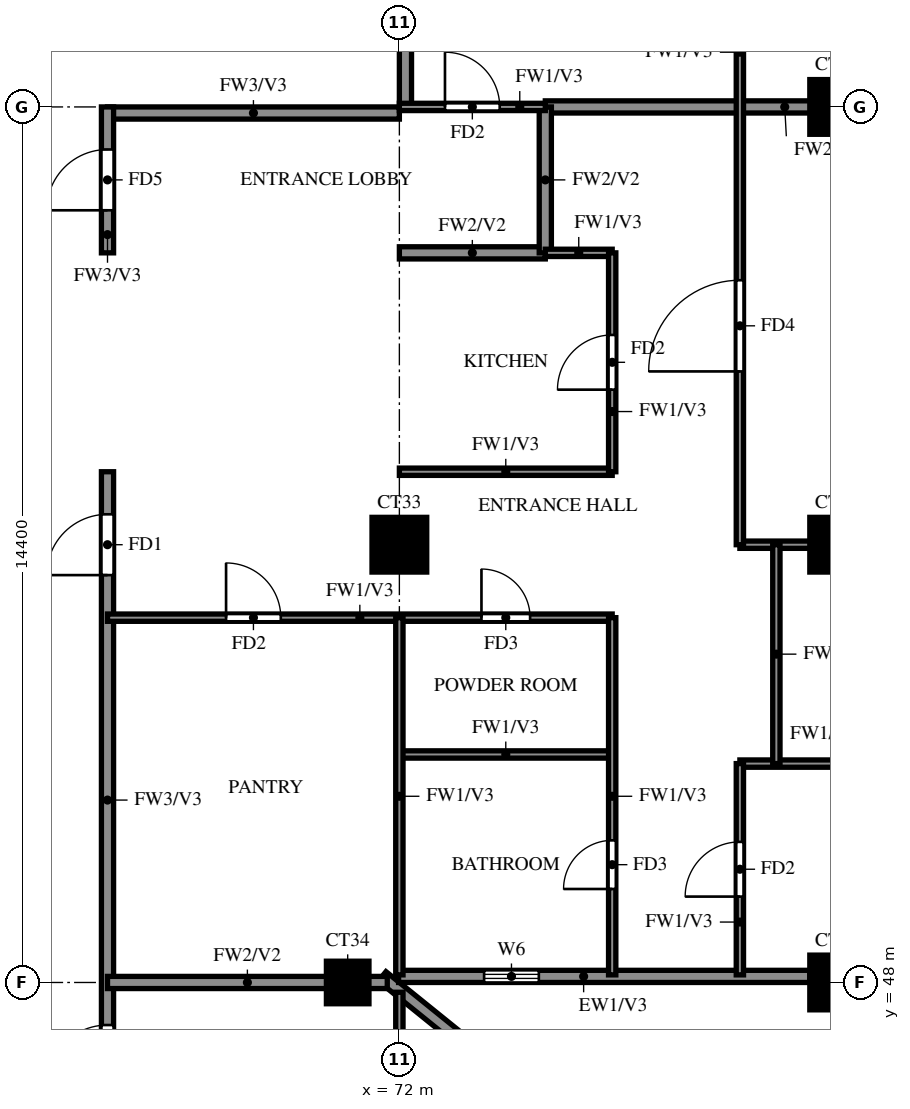
"""IFC4 building model, lengths in metres.
Left out: names, types, materials, properties, quantities, classifications, styles, units other than length and angle.
Written with IfcOpenShell. Run it as: python <this file> out.ifc"""

import sys

from ifc_helpers import new_model, si_unit, direction, frame, frame_2d, origin, origin_2d, place, context, subcontext, project, spatial, rectangle, extrude, source, transform, mapped, element, fill, save


model = new_model("IFC4")
c1 = context("Model", 3, precision=1e-05, world=origin(), true_north=direction((0.0, 1.0)))
c2 = subcontext(c1, "Body", "Model", "MODEL_VIEW")
j1 = project(units=[si_unit("LENGTHUNIT", "METRE"), si_unit("PLANEANGLEUNIT", "RADIAN")], contexts=[c1])
p1 = place(None, origin())
s1 = spatial("IfcSite", under=j1, at=p1, CompositionType="ELEMENT")
p2 = place(p1, origin())
s2 = spatial("IfcBuilding", under=s1, at=p2, CompositionType="ELEMENT")
p3 = place(p2, frame((0.0, 0.0, 225.5)))
s3 = spatial("IfcBuildingStorey", under=s2, at=p3, CompositionType="ELEMENT", Elevation=225.5)
m1 = source(origin(), c2, "Body", "SweptSolid", [
    extrude(rectangle(XDim=0.7, YDim=0.7, at=origin_2d()), origin(), (0.0, 0.0, 1.0), 3.22),
])
p4 = place(p3, frame((71.15, 48.0, 0.0), z_axis=(0.0, 0.0, 1.0), x_axis=(1.0, 0.0, 0.0)))
e1 = element("IfcColumn", 1, at=p4, inside=s3, PredefinedType="COLUMN", context=c2, shape_type="MappedRepresentation", body=[
    mapped(m1, transform((0.0, 0.0, 0.0))),
])
m2 = source(origin(), c2, "Body", "SweptSolid", [
    extrude(rectangle(XDim=0.9, YDim=0.9, at=origin_2d()), origin(), (0.0, 0.0, 1.0), 3.22),
])
for number, where, z_axis, x_axis in (
    (2, (79.2, 48.0, 0.0), (0.0, 0.0, 1.0), (1.0, 0.0, 0.0)),
    (3, (72.0, 55.2, 0.0), (0.0, 0.0, 1.0), (1.0, 0.0, 0.0)),
    (4, (79.2, 55.2, 0.0), (0.0, 0.0, 1.0), (1.0, 0.0, 0.0)),
    (5, (79.2, 62.4, 0.0), (0.0, 0.0, 1.0), (1.0, 0.0, 0.0)),
):
    element("IfcColumn", number, at=place(p3, frame(where, z_axis=z_axis, x_axis=x_axis)), inside=s3, PredefinedType="COLUMN", context=c2, shape_type="MappedRepresentation", body=[
        mapped(m2, transform((0.0, 0.0, 0.0))),
    ])
p5 = place(p3, frame((81.907, 39.87, 0.0), z_axis=(0.0, 0.0, 1.0), x_axis=(-0.777936274417, 0.62834318087, 0.0)))
e6 = element("IfcWall", 6, at=p5, inside=s3, PredefinedType="SOLIDWALL", context=c2, shape_type="SweptSolid", body=[
    extrude(rectangle(XDim=13.099, YDim=0.2, at=frame_2d((6.549, 0.0))), origin(), (0.0, 0.0, 1.0), 3.22),
])
p6 = place(p5, frame((9.938, 0.0, 1.5)))
e7 = element("IfcOpeningElement", 7, at=p6, cuts=e6, PredefinedType="OPENING", context=c2, shape_type="SweptSolid", body=[
    extrude(rectangle(XDim=0.9, YDim=0.9, at=frame_2d((0.45, 0.45))), frame((0.0, 0.11, 0.0), z_axis=(0.0, -1.0, 0.0), x_axis=(1.0, 0.0, 0.0)), (0.0, 0.0, 1.0), 0.22),
])
p7 = place(p3, frame((71.987, 48.1, 0.0), z_axis=(0.0, 0.0, 1.0), x_axis=(1.0, 0.0, 0.0)))
e8 = element("IfcWall", 8, at=p7, inside=s3, PredefinedType="SOLIDWALL", context=c2, shape_type="SweptSolid", body=[
    extrude(rectangle(XDim=6.763, YDim=0.2, at=frame_2d((3.381, 0.0))), origin(), (0.0, 0.0, 1.0), 3.22),
])
p8 = place(p7, frame((1.406, 0.0, 1.5)))
e9 = element("IfcOpeningElement", 9, at=p8, cuts=e8, PredefinedType="OPENING", context=c2, shape_type="SweptSolid", body=[
    extrude(rectangle(XDim=0.9, YDim=0.9, at=frame_2d((0.45, 0.45))), frame((0.0, 0.11, 0.0), z_axis=(0.0, -1.0, 0.0), x_axis=(1.0, 0.0, 0.0)), (0.0, 0.0, 1.0), 0.22),
])
p9 = place(p3, frame((67.2, 62.3, 0.0), z_axis=(0.0, 0.0, 1.0), x_axis=(1.0, 0.0, 0.0)))
e10 = element("IfcWall", 10, at=p9, inside=s3, PredefinedType="SOLIDWALL", context=c2, shape_type="SweptSolid", body=[
    extrude(rectangle(XDim=4.8, YDim=0.2, at=frame_2d((2.4, 0.0))), origin(), (0.0, 0.0, 1.0), 3.22),
])
p10 = place(p3, frame((67.2, 45.6, 0.0), z_axis=(0.0, 0.0, 1.0), x_axis=(0.0, 1.0, 0.0)))
e11 = element("IfcWall", 11, at=p10, inside=s3, PredefinedType="SOLIDWALL", context=c2, shape_type="SweptSolid", body=[
    extrude(rectangle(XDim=10.8, YDim=0.2, at=frame_2d((5.4, 0.0))), origin(), (0.0, 0.0, 1.0), 3.22),
])
p11 = place(p10, frame((9.1, 0.0, 0.0)))
e12 = element("IfcOpeningElement", 12, at=p11, cuts=e11, PredefinedType="OPENING", context=c2, shape_type="SweptSolid", body=[
    extrude(rectangle(XDim=1.0, YDim=2.1, at=frame_2d((0.5, 1.05))), frame((0.0, 0.11, 0.0), z_axis=(0.0, -1.0, 0.0), x_axis=(1.0, 0.0, 0.0)), (0.0, 0.0, 1.0), 0.22),
])
p12 = place(p10, frame((0.7, 0.0, 0.0)))
e13 = element("IfcOpeningElement", 13, at=p12, cuts=e11, PredefinedType="OPENING", context=c2, shape_type="SweptSolid", body=[
    extrude(rectangle(XDim=1.0, YDim=2.1, at=frame_2d((0.5, 1.05))), frame((0.0, 0.11, 0.0), z_axis=(0.0, -1.0, 0.0), x_axis=(1.0, 0.0, 0.0)), (0.0, 0.0, 1.0), 0.22),
])
p13 = place(p3, frame((67.2, 60.0, 0.0), z_axis=(0.0, 0.0, 1.0), x_axis=(0.0, 1.0, 0.0)))
e14 = element("IfcWall", 14, at=p13, inside=s3, PredefinedType="SOLIDWALL", context=c2, shape_type="SweptSolid", body=[
    extrude(rectangle(XDim=2.4, YDim=0.2, at=frame_2d((1.2, 0.0))), origin(), (0.0, 0.0, 1.0), 3.22),
])
p14 = place(p13, frame((0.7, 0.0, 0.0)))
e15 = element("IfcOpeningElement", 15, at=p14, cuts=e14, PredefinedType="OPENING", context=c2, shape_type="SweptSolid", body=[
    extrude(rectangle(XDim=1.0, YDim=2.1, at=frame_2d((0.5, 1.05))), frame((0.0, 0.11, 0.0), z_axis=(0.0, -1.0, 0.0), x_axis=(1.0, 0.0, 0.0)), (0.0, 0.0, 1.0), 0.22),
])
p15 = place(p3, frame((72.1, 62.4, 0.0), z_axis=(0.0, 0.0, 1.0), x_axis=(0.0, 1.0, 0.0)))
e16 = element("IfcWall", 16, at=p15, inside=s3, PredefinedType="SOLIDWALL", context=c2, shape_type="SweptSolid", body=[
    extrude(rectangle(XDim=15.6, YDim=0.2, at=frame_2d((7.8, 0.0))), origin(), (0.0, 0.0, 1.0), 3.22),
])
p16 = place(p3, frame((67.2, 48.0, 0.0), z_axis=(0.0, 0.0, 1.0), x_axis=(1.0, 0.0, 0.0)))
e17 = element("IfcWall", 17, at=p16, inside=s3, PredefinedType="SOLIDWALL", context=c2, shape_type="SweptSolid", body=[
    extrude(rectangle(XDim=4.601, YDim=0.2, at=frame_2d((2.301, 0.0))), origin(), (0.0, 0.0, 1.0), 3.22),
])
p17 = place(p3, frame((72.0, 60.0, 0.0), z_axis=(0.0, 0.0, 1.0), x_axis=(1.0, 0.0, 0.0)))
e18 = element("IfcWall", 18, at=p17, inside=s3, PredefinedType="SOLIDWALL", context=c2, shape_type="SweptSolid", body=[
    extrude(rectangle(XDim=2.4, YDim=0.2, at=frame_2d((1.2, 0.0))), origin(), (0.0, 0.0, 1.0), 3.22),
])
p18 = place(p3, frame((74.4, 62.4, 0.0), z_axis=(0.0, 0.0, 1.0), x_axis=(1.0, 0.0, 0.0)))
e19 = element("IfcWall", 19, at=p18, inside=s3, PredefinedType="SOLIDWALL", context=c2, shape_type="SweptSolid", body=[
    extrude(rectangle(XDim=7.875, YDim=0.2, at=frame_2d((3.938, 0.0))), origin(), (0.0, 0.0, 1.0), 3.22),
])
p19 = place(p3, frame((74.4, 60.0, 0.0), z_axis=(0.0, 0.0, 1.0), x_axis=(0.0, 1.0, 0.0)))
e20 = element("IfcWall", 20, at=p19, inside=s3, PredefinedType="SOLIDWALL", context=c2, shape_type="SweptSolid", body=[
    extrude(rectangle(XDim=2.4, YDim=0.2, at=frame_2d((1.2, 0.0))), origin(), (0.0, 0.0, 1.0), 3.22),
])
p20 = place(p3, frame((77.6, 51.6, 0.0), z_axis=(0.0, 0.0, 1.0), x_axis=(1.0, 0.0, 0.0)))
e21 = element("IfcWall", 21, at=p20, inside=s3, PredefinedType="PARTITIONING", context=c2, shape_type="SweptSolid", body=[
    extrude(rectangle(XDim=4.675, YDim=0.12, at=frame_2d((2.337, 0.0))), origin(), (0.0, 0.0, 1.0), 2.32),
])
p21 = place(p20, frame((2.238, 0.0, 0.0)))
e22 = element("IfcOpeningElement", 22, at=p21, cuts=e21, PredefinedType="OPENING", context=c2, shape_type="SweptSolid", body=[
    extrude(rectangle(XDim=0.8, YDim=2.1, at=frame_2d((0.4, 1.05))), frame((0.0, 0.07, 0.0), z_axis=(0.0, -1.0, 0.0), x_axis=(1.0, 0.0, 0.0)), (0.0, 0.0, 1.0), 0.14),
])
p22 = place(p3, frame((72.0, 51.75, 0.0), z_axis=(0.0, 0.0, 1.0), x_axis=(1.0, 0.0, 0.0)))
e23 = element("IfcWall", 23, at=p22, inside=s3, PredefinedType="PARTITIONING", context=c2, shape_type="SweptSolid", body=[
    extrude(rectangle(XDim=3.5, YDim=0.12, at=frame_2d((1.75, 0.0))), origin(), (0.0, 0.0, 1.0), 3.22),
])
p23 = place(p3, frame((67.2, 54.0, 0.0), z_axis=(0.0, 0.0, 1.0), x_axis=(1.0, 0.0, 0.0)))
e24 = element("IfcWall", 24, at=p23, inside=s3, PredefinedType="PARTITIONING", context=c2, shape_type="SweptSolid", body=[
    extrude(rectangle(XDim=8.3, YDim=0.12, at=frame_2d((4.15, 0.0))), origin(), (0.0, 0.0, 1.0), 3.22),
])
p24 = place(p23, frame((6.15, 0.0, 0.0)))
e25 = element("IfcOpeningElement", 25, at=p24, cuts=e24, PredefinedType="OPENING", context=c2, shape_type="SweptSolid", body=[
    extrude(rectangle(XDim=0.8, YDim=2.1, at=frame_2d((0.4, 1.05))), frame((0.0, 0.07, 0.0), z_axis=(0.0, -1.0, 0.0), x_axis=(1.0, 0.0, 0.0)), (0.0, 0.0, 1.0), 0.14),
])
p25 = place(p23, frame((1.95, 0.0, 0.0)))
e26 = element("IfcOpeningElement", 26, at=p25, cuts=e24, PredefinedType="OPENING", context=c2, shape_type="SweptSolid", body=[
    extrude(rectangle(XDim=0.9, YDim=2.1, at=frame_2d((0.45, 1.05))), frame((0.0, 0.07, 0.0), z_axis=(0.0, -1.0, 0.0), x_axis=(1.0, 0.0, 0.0)), (0.0, 0.0, 1.0), 0.14),
])
p26 = place(p3, frame((77.6, 55.2, 0.0), z_axis=(0.0, 0.0, 1.0), x_axis=(1.0, 0.0, 0.0)))
e27 = element("IfcWall", 27, at=p26, inside=s3, PredefinedType="PARTITIONING", context=c2, shape_type="SweptSolid", body=[
    extrude(rectangle(XDim=4.675, YDim=0.12, at=frame_2d((2.337, 0.0))), origin(), (0.0, 0.0, 1.0), 3.22),
])
p27 = place(p3, frame((72.0, 56.4, 0.0), z_axis=(0.0, 0.0, 1.0), x_axis=(1.0, 0.0, 0.0)))
e28 = element("IfcWall", 28, at=p27, inside=s3, PredefinedType="PARTITIONING", context=c2, shape_type="SweptSolid", body=[
    extrude(rectangle(XDim=3.5, YDim=0.12, at=frame_2d((1.75, 0.0))), origin(), (0.0, 0.0, 1.0), 3.22),
])
p28 = place(p3, frame((74.4, 60.0, 0.0), z_axis=(0.0, 0.0, 1.0), x_axis=(1.0, 0.0, 0.0)))
e29 = element("IfcWall", 29, at=p28, inside=s3, PredefinedType="PARTITIONING", context=c2, shape_type="SweptSolid", body=[
    extrude(rectangle(XDim=1.1, YDim=0.12, at=frame_2d((0.55, 0.0))), origin(), (0.0, 0.0, 1.0), 3.22),
])
p29 = place(p3, frame((72.0, 62.4, 0.0), z_axis=(0.0, 0.0, 1.0), x_axis=(1.0, 0.0, 0.0)))
e30 = element("IfcWall", 30, at=p29, inside=s3, PredefinedType="PARTITIONING", context=c2, shape_type="SweptSolid", body=[
    extrude(rectangle(XDim=2.4, YDim=0.12, at=frame_2d((1.2, 0.0))), origin(), (0.0, 0.0, 1.0), 3.22),
])
p30 = place(p29, frame((0.75, 0.0, 0.0)))
e31 = element("IfcOpeningElement", 31, at=p30, cuts=e30, PredefinedType="OPENING", context=c2, shape_type="SweptSolid", body=[
    extrude(rectangle(XDim=0.9, YDim=2.1, at=frame_2d((0.45, 1.05))), frame((0.0, 0.07, 0.0), z_axis=(0.0, -1.0, 0.0), x_axis=(1.0, 0.0, 0.0)), (0.0, 0.0, 1.0), 0.14),
])
p31 = place(p3, frame((72.0, 39.725, 0.0), z_axis=(0.0, 0.0, 1.0), x_axis=(0.0, 1.0, 0.0)))
e32 = element("IfcWall", 32, at=p31, inside=s3, PredefinedType="PARTITIONING", context=c2, shape_type="SweptSolid", body=[
    extrude(rectangle(XDim=8.114, YDim=0.12, at=frame_2d((4.057, 0.0))), origin(), (0.0, 0.0, 1.0), 2.32),
])
p32 = place(p31, frame((1.788, 0.0, 0.0)))
e33 = element("IfcOpeningElement", 33, at=p32, cuts=e32, PredefinedType="OPENING", context=c2, shape_type="SweptSolid", body=[
    extrude(rectangle(XDim=0.9, YDim=2.1, at=frame_2d((0.45, 1.05))), frame((0.0, 0.07, 0.0), z_axis=(0.0, -1.0, 0.0), x_axis=(1.0, 0.0, 0.0)), (0.0, 0.0, 1.0), 0.14),
])
p33 = place(p31, frame((4.575, 0.0, 0.0)))
e34 = element("IfcOpeningElement", 34, at=p33, cuts=e32, PredefinedType="OPENING", context=c2, shape_type="SweptSolid", body=[
    extrude(rectangle(XDim=0.8, YDim=2.1, at=frame_2d((0.4, 1.05))), frame((0.0, 0.07, 0.0), z_axis=(0.0, -1.0, 0.0), x_axis=(1.0, 0.0, 0.0)), (0.0, 0.0, 1.0), 0.14),
])
p34 = place(p3, frame((72.0, 48.125, 0.0), z_axis=(0.0, 0.0, 1.0), x_axis=(0.0, 1.0, 0.0)))
e35 = element("IfcWall", 35, at=p34, inside=s3, PredefinedType="PARTITIONING", context=c2, shape_type="SweptSolid", body=[
    extrude(rectangle(XDim=5.875, YDim=0.12, at=frame_2d((2.938, 0.0))), origin(), (0.0, 0.0, 1.0), 3.22),
])
p35 = place(p3, frame((75.5, 48.125, 0.0), z_axis=(0.0, 0.0, 1.0), x_axis=(0.0, 1.0, 0.0)))
e36 = element("IfcWall", 36, at=p35, inside=s3, PredefinedType="PARTITIONING", context=c2, shape_type="SweptSolid", body=[
    extrude(rectangle(XDim=5.875, YDim=0.12, at=frame_2d((2.938, 0.0))), origin(), (0.0, 0.0, 1.0), 3.22),
])
p36 = place(p35, frame((1.413, 0.0, 0.0)))
e37 = element("IfcOpeningElement", 37, at=p36, cuts=e36, PredefinedType="OPENING", context=c2, shape_type="SweptSolid", body=[
    extrude(rectangle(XDim=0.8, YDim=2.1, at=frame_2d((0.4, 1.05))), frame((0.0, 0.07, 0.0), z_axis=(0.0, -1.0, 0.0), x_axis=(1.0, 0.0, 0.0)), (0.0, 0.0, 1.0), 0.14),
])
p37 = place(p3, frame((75.5, 56.4, 0.0), z_axis=(0.0, 0.0, 1.0), x_axis=(0.0, 1.0, 0.0)))
e38 = element("IfcWall", 38, at=p37, inside=s3, PredefinedType="PARTITIONING", context=c2, shape_type="SweptSolid", body=[
    extrude(rectangle(XDim=3.6, YDim=0.12, at=frame_2d((1.8, 0.0))), origin(), (0.0, 0.0, 1.0), 3.22),
])
p38 = place(p37, frame((1.35, 0.0, 0.0)))
e39 = element("IfcOpeningElement", 39, at=p38, cuts=e38, PredefinedType="OPENING", context=c2, shape_type="SweptSolid", body=[
    extrude(rectangle(XDim=0.9, YDim=2.1, at=frame_2d((0.45, 1.05))), frame((0.0, 0.07, 0.0), z_axis=(0.0, -1.0, 0.0), x_axis=(1.0, 0.0, 0.0)), (0.0, 0.0, 1.0), 0.14),
])
p39 = place(p3, frame((77.6, 48.125, 0.0), z_axis=(0.0, 0.0, 1.0), x_axis=(0.0, 1.0, 0.0)))
e40 = element("IfcWall", 40, at=p39, inside=s3, PredefinedType="PARTITIONING", context=c2, shape_type="SweptSolid", body=[
    extrude(rectangle(XDim=3.475, YDim=0.12, at=frame_2d((1.738, 0.0))), origin(), (0.0, 0.0, 1.0), 3.22),
])
p40 = place(p39, frame((1.288, 0.0, 0.0)))
e41 = element("IfcOpeningElement", 41, at=p40, cuts=e40, PredefinedType="OPENING", context=c2, shape_type="SweptSolid", body=[
    extrude(rectangle(XDim=0.9, YDim=2.1, at=frame_2d((0.45, 1.05))), frame((0.0, 0.07, 0.0), z_axis=(0.0, -1.0, 0.0), x_axis=(1.0, 0.0, 0.0)), (0.0, 0.0, 1.0), 0.14),
])
p41 = place(p3, frame((77.6, 55.2, 0.0), z_axis=(0.0, 0.0, 1.0), x_axis=(0.0, 1.0, 0.0)))
e42 = element("IfcWall", 42, at=p41, inside=s3, PredefinedType="PARTITIONING", context=c2, shape_type="SweptSolid", body=[
    extrude(rectangle(XDim=18.0, YDim=0.12, at=frame_2d((9.0, 0.0))), origin(), (0.0, 0.0, 1.0), 3.22),
])
p42 = place(p41, frame((2.85, 0.0, 0.0)))
e43 = element("IfcOpeningElement", 43, at=p42, cuts=e42, PredefinedType="OPENING", context=c2, shape_type="SweptSolid", body=[
    extrude(rectangle(XDim=1.5, YDim=2.1, at=frame_2d((0.75, 1.05))), frame((0.0, 0.07, 0.0), z_axis=(0.0, -1.0, 0.0), x_axis=(1.0, 0.0, 0.0)), (0.0, 0.0, 1.0), 0.14),
])
p43 = place(p41, frame((8.55, 0.0, 0.0)))
e44 = element("IfcOpeningElement", 44, at=p43, cuts=e42, PredefinedType="OPENING", context=c2, shape_type="SweptSolid", body=[
    extrude(rectangle(XDim=0.9, YDim=2.1, at=frame_2d((0.45, 1.05))), frame((0.0, 0.07, 0.0), z_axis=(0.0, -1.0, 0.0), x_axis=(1.0, 0.0, 0.0)), (0.0, 0.0, 1.0), 0.14),
])
p44 = place(p41, frame((12.15, 0.0, 0.0)))
e45 = element("IfcOpeningElement", 45, at=p44, cuts=e42, PredefinedType="OPENING", context=c2, shape_type="SweptSolid", body=[
    extrude(rectangle(XDim=0.9, YDim=2.1, at=frame_2d((0.45, 1.05))), frame((0.0, 0.07, 0.0), z_axis=(0.0, -1.0, 0.0), x_axis=(1.0, 0.0, 0.0)), (0.0, 0.0, 1.0), 0.14),
])
p45 = place(p41, frame((15.75, 0.0, 0.0)))
e46 = element("IfcOpeningElement", 46, at=p45, cuts=e42, PredefinedType="OPENING", context=c2, shape_type="SweptSolid", body=[
    extrude(rectangle(XDim=0.9, YDim=2.1, at=frame_2d((0.45, 1.05))), frame((0.0, 0.07, 0.0), z_axis=(0.0, -1.0, 0.0), x_axis=(1.0, 0.0, 0.0)), (0.0, 0.0, 1.0), 0.14),
])
p46 = place(p3, frame((78.2, 51.6, 0.0), z_axis=(0.0, 0.0, 1.0), x_axis=(0.0, 1.0, 0.0)))
e47 = element("IfcWall", 47, at=p46, inside=s3, PredefinedType="PARTITIONING", context=c2, shape_type="SweptSolid", body=[
    extrude(rectangle(XDim=3.6, YDim=0.12, at=frame_2d((1.8, 0.0))), origin(), (0.0, 0.0, 1.0), 3.22),
])
p47 = place(p8, origin())
e48 = element("IfcWindow", 48, at=p47, inside=s3, PartitioningType="SINGLE_PANEL", PredefinedType="WINDOW", context=c2, shape_type="SweptSolid", body=[
    extrude(rectangle(XDim=0.9, YDim=0.9, at=frame_2d((0.45, 0.45))), frame((0.0, 0.03, 0.0), z_axis=(0.0, -1.0, 0.0), x_axis=(1.0, 0.0, 0.0)), (0.0, 0.0, 1.0), 0.06),
])
fill(e9, e48)
p48 = place(p11, origin())
e49 = element("IfcDoor", 49, at=p48, inside=s3, OperationType="SINGLE_SWING_RIGHT", PredefinedType="DOOR", context=c2, shape_type="SweptSolid", body=[
    extrude(rectangle(XDim=1.0, YDim=2.1, at=frame_2d((0.5, 1.05))), frame((0.0, 0.025, 0.0), z_axis=(0.0, -1.0, 0.0), x_axis=(1.0, 0.0, 0.0)), (0.0, 0.0, 1.0), 0.05),
])
fill(e12, e49)
p49 = place(p40, origin())
e50 = element("IfcDoor", 50, at=p49, inside=s3, OperationType="SINGLE_SWING_LEFT", PredefinedType="DOOR", context=c2, shape_type="SweptSolid", body=[
    extrude(rectangle(XDim=0.9, YDim=2.1, at=frame_2d((0.45, 1.05))), frame((0.0, 0.025, 0.0), z_axis=(0.0, -1.0, 0.0), x_axis=(1.0, 0.0, 0.0)), (0.0, 0.0, 1.0), 0.05),
])
fill(e41, e50)
p50 = place(p42, origin())
e51 = element("IfcDoor", 51, at=p50, inside=s3, OperationType="SINGLE_SWING_RIGHT", PredefinedType="DOOR", context=c2, shape_type="SweptSolid", body=[
    extrude(rectangle(XDim=1.5, YDim=2.1, at=frame_2d((0.75, 1.05))), frame((0.0, 0.025, 0.0), z_axis=(0.0, -1.0, 0.0), x_axis=(1.0, 0.0, 0.0)), (0.0, 0.0, 1.0), 0.05),
])
fill(e43, e51)
p51 = place(p36, origin())
e52 = element("IfcDoor", 52, at=p51, inside=s3, OperationType="SINGLE_SWING_LEFT", PredefinedType="DOOR", context=c2, shape_type="SweptSolid", body=[
    extrude(rectangle(XDim=0.8, YDim=2.1, at=frame_2d((0.4, 1.05))), frame((0.0, 0.025, 0.0), z_axis=(0.0, -1.0, 0.0), x_axis=(1.0, 0.0, 0.0)), (0.0, 0.0, 1.0), 0.05),
])
fill(e37, e52)
p52 = place(p24, origin())
e53 = element("IfcDoor", 53, at=p52, inside=s3, OperationType="SINGLE_SWING_LEFT", PredefinedType="DOOR", context=c2, shape_type="SweptSolid", body=[
    extrude(rectangle(XDim=0.8, YDim=2.1, at=frame_2d((0.4, 1.05))), frame((0.0, 0.025, 0.0), z_axis=(0.0, -1.0, 0.0), x_axis=(1.0, 0.0, 0.0)), (0.0, 0.0, 1.0), 0.05),
])
fill(e25, e53)
p53 = place(p38, origin())
e54 = element("IfcDoor", 54, at=p53, inside=s3, OperationType="SINGLE_SWING_RIGHT", PredefinedType="DOOR", context=c2, shape_type="SweptSolid", body=[
    extrude(rectangle(XDim=0.9, YDim=2.1, at=frame_2d((0.45, 1.05))), frame((0.0, 0.025, 0.0), z_axis=(0.0, -1.0, 0.0), x_axis=(1.0, 0.0, 0.0)), (0.0, 0.0, 1.0), 0.05),
])
fill(e39, e54)
p54 = place(p25, origin())
e55 = element("IfcDoor", 55, at=p54, inside=s3, OperationType="SINGLE_SWING_LEFT", PredefinedType="DOOR", context=c2, shape_type="SweptSolid", body=[
    extrude(rectangle(XDim=0.9, YDim=2.1, at=frame_2d((0.45, 1.05))), frame((0.0, 0.025, 0.0), z_axis=(0.0, -1.0, 0.0), x_axis=(1.0, 0.0, 0.0)), (0.0, 0.0, 1.0), 0.05),
])
fill(e26, e55)
p55 = place(p30, origin())
e56 = element("IfcDoor", 56, at=p55, inside=s3, OperationType="SINGLE_SWING_LEFT", PredefinedType="DOOR", context=c2, shape_type="SweptSolid", body=[
    extrude(rectangle(XDim=0.9, YDim=2.1, at=frame_2d((0.45, 1.05))), frame((0.0, 0.025, 0.0), z_axis=(0.0, -1.0, 0.0), x_axis=(1.0, 0.0, 0.0)), (0.0, 0.0, 1.0), 0.05),
])
fill(e31, e56)
p56 = place(p14, origin())
e57 = element("IfcDoor", 57, at=p56, inside=s3, OperationType="SINGLE_SWING_LEFT", PredefinedType="DOOR", context=c2, shape_type="SweptSolid", body=[
    extrude(rectangle(XDim=1.0, YDim=2.1, at=frame_2d((0.5, 1.05))), frame((0.0, 0.025, 0.0), z_axis=(0.0, -1.0, 0.0), x_axis=(1.0, 0.0, 0.0)), (0.0, 0.0, 1.0), 0.05),
])
fill(e15, e57)
p57 = place(p12, origin())
e58 = element("IfcDoor", 58, at=p57, inside=s3, OperationType="SINGLE_SWING_LEFT", PredefinedType="DOOR", context=c2, shape_type="SweptSolid", body=[
    extrude(rectangle(XDim=1.0, YDim=2.1, at=frame_2d((0.5, 1.05))), frame((0.0, 0.025, 0.0), z_axis=(0.0, -1.0, 0.0), x_axis=(1.0, 0.0, 0.0)), (0.0, 0.0, 1.0), 0.05),
])
fill(e13, e58)
save(model, sys.argv[1])
